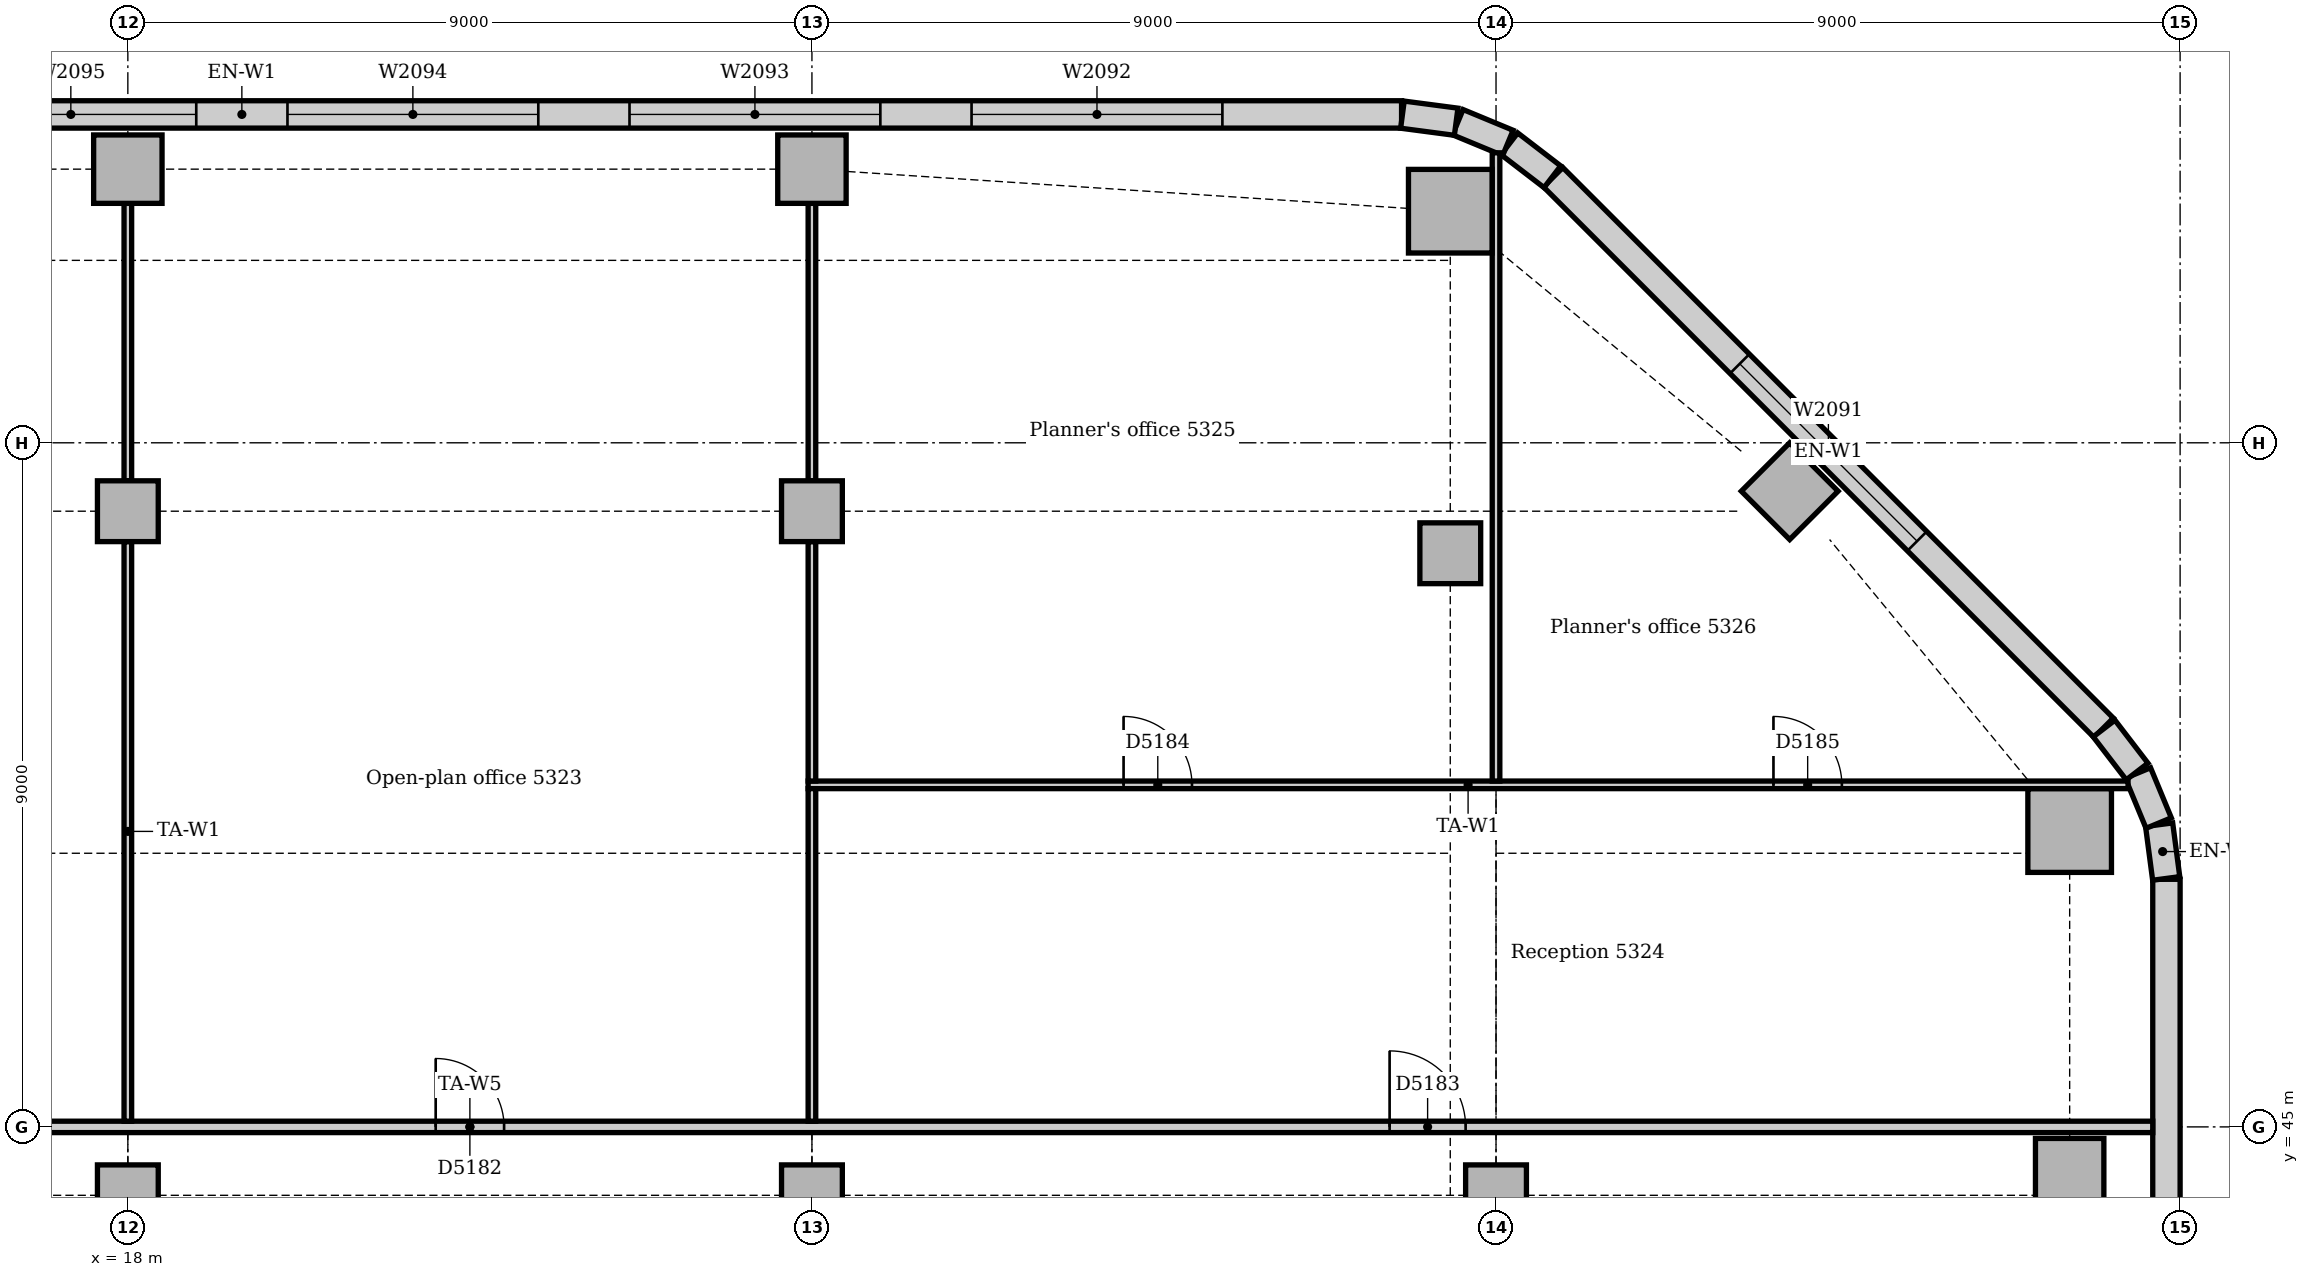
"""IFC4 building model, lengths in metres.
Left out: names, types, materials, properties, quantities, classifications, styles, units other than length and angle.
Written with IfcOpenShell. Run it as: python <this file> out.ifc"""

import sys

from ifc_helpers import new_model, si_unit, direction, frame, frame_2d, origin, origin_2d, place, context, subcontext, project, spatial, rectangle, extrude, element, fill, save


model = new_model("IFC4")
c1 = context("Model", 3, precision=1e-05, world=origin(), true_north=direction((0.0, 1.0)))
c2 = subcontext(c1, "Body", "Model", "MODEL_VIEW")
j1 = project(units=[si_unit("LENGTHUNIT", "METRE"), si_unit("PLANEANGLEUNIT", "RADIAN")], contexts=[c1])
p1 = place(None, origin())
s1 = spatial("IfcSite", under=j1, at=p1, CompositionType="ELEMENT")
p2 = place(p1, origin())
s2 = spatial("IfcBuilding", under=s1, at=p2, CompositionType="ELEMENT")
p3 = place(p2, frame((0.0, 0.0, 222.0)))
s3 = spatial("IfcBuildingStorey", under=s2, at=p3, CompositionType="ELEMENT", Elevation=222.0)
for number, where, z_axis, x_axis in (
    (1, (43.547, 48.898, 0.0), (0.0, 0.0, 1.0), (1.0, 0.0, 0.0)),
    (2, (35.398, 57.047, 0.0), (0.0, 0.0, 1.0), (1.0, 0.0, 0.0)),
):
    element("IfcColumn", number, at=place(p3, frame(where, z_axis=z_axis, x_axis=x_axis)), inside=s3, PredefinedType="COLUMN", context=c2, shape_type="SweptSolid", body=[
        extrude(rectangle(XDim=1.1, YDim=1.1, at=origin_2d()), origin(), (0.0, 0.0, 1.0), 3.85),
    ])
for number, where, z_axis, x_axis in (
    (3, (43.547, 44.398, 0.0), (0.0, 0.0, 1.0), (1.0, 0.0, 0.0)),
    (4, (39.864, 53.364, 0.0), (0.0, 0.0, 1.0), (0.707, 0.707, 0.0)),
    (5, (18.0, 57.6, 0.0), (0.0, 0.0, 1.0), (1.0, 0.0, 0.0)),
    (6, (27.0, 57.6, 0.0), (0.0, 0.0, 1.0), (1.0, 0.0, 0.0)),
):
    element("IfcColumn", number, at=place(p3, frame(where, z_axis=z_axis, x_axis=x_axis)), inside=s3, PredefinedType="COLUMN", context=c2, shape_type="SweptSolid", body=[
        extrude(rectangle(XDim=0.9, YDim=0.9, at=origin_2d()), origin(), (0.0, 0.0, 1.0), 3.85),
    ])
for number, where, z_axis, x_axis in (
    (7, (18.0, 44.1, 0.0), (0.0, 0.0, 1.0), (1.0, 0.0, 0.0)),
    (8, (18.0, 53.1, 0.0), (0.0, 0.0, 1.0), (1.0, 0.0, 0.0)),
    (9, (27.0, 44.1, 0.0), (0.0, 0.0, 1.0), (1.0, 0.0, 0.0)),
    (10, (27.0, 53.1, 0.0), (0.0, 0.0, 1.0), (1.0, 0.0, 0.0)),
    (11, (36.0, 44.1, 0.0), (0.0, 0.0, 1.0), (1.0, 0.0, 0.0)),
    (12, (35.398, 52.547, 0.0), (0.0, 0.0, 1.0), (1.0, 0.0, 0.0)),
):
    element("IfcColumn", number, at=place(p3, frame(where, z_axis=z_axis, x_axis=x_axis)), inside=s3, PredefinedType="COLUMN", context=c2, shape_type="SweptSolid", body=[
        extrude(rectangle(XDim=0.8, YDim=0.8, at=origin_2d()), origin(), (0.0, 0.0, 1.0), 3.85),
    ])
p4 = place(p3, frame((44.82, 23.743, 0.0), z_axis=(0.0, 0.0, 1.0), x_axis=(0.0, 1.0, 0.0)))
e13 = element("IfcWall", 13, at=p4, inside=s3, PredefinedType="STANDARD", context=c2, shape_type="SweptSolid", body=[
    extrude(rectangle(XDim=24.515, YDim=0.36, at=frame_2d((12.257, 0.0))), origin(), (0.0, 0.0, 1.0), 3.85),
])
p5 = place(p4, frame((3.857, 0.0, 0.9)))
e14 = element("IfcOpeningElement", 14, at=p5, cuts=e13, PredefinedType="OPENING", context=c2, shape_type="SweptSolid", body=[
    extrude(rectangle(XDim=3.3, YDim=1.6, at=frame_2d((1.65, 0.8))), frame((0.0, 0.19, 0.0), z_axis=(0.0, -1.0, 0.0), x_axis=(1.0, 0.0, 0.0)), (0.0, 0.0, 1.0), 0.38),
])
p6 = place(p4, frame((8.357, 0.0, 0.9)))
e15 = element("IfcOpeningElement", 15, at=p6, cuts=e13, PredefinedType="OPENING", context=c2, shape_type="SweptSolid", body=[
    extrude(rectangle(XDim=3.3, YDim=1.6, at=frame_2d((1.65, 0.8))), frame((0.0, 0.19, 0.0), z_axis=(0.0, -1.0, 0.0), x_axis=(1.0, 0.0, 0.0)), (0.0, 0.0, 1.0), 0.38),
])
p7 = place(p4, frame((12.857, 0.0, 0.9)))
e16 = element("IfcOpeningElement", 16, at=p7, cuts=e13, PredefinedType="OPENING", context=c2, shape_type="SweptSolid", body=[
    extrude(rectangle(XDim=3.3, YDim=1.6, at=frame_2d((1.65, 0.8))), frame((0.0, 0.19, 0.0), z_axis=(0.0, -1.0, 0.0), x_axis=(1.0, 0.0, 0.0)), (0.0, 0.0, 1.0), 0.38),
])
p8 = place(p4, frame((18.457, 0.0, 0.9)))
e17 = element("IfcOpeningElement", 17, at=p8, cuts=e13, PredefinedType="OPENING", context=c2, shape_type="SweptSolid", body=[
    extrude(rectangle(XDim=1.8, YDim=1.6, at=frame_2d((0.9, 0.8))), frame((0.0, 0.19, 0.0), z_axis=(0.0, -1.0, 0.0), x_axis=(1.0, 0.0, 0.0)), (0.0, 0.0, 1.0), 0.38),
])
p9 = place(p3, frame((43.994, 50.251, 0.0), z_axis=(0.0, 0.0, 1.0), x_axis=(-0.707106781187, 0.707106781187, 0.0)))
e18 = element("IfcWall", 18, at=p9, inside=s3, PredefinedType="STANDARD", context=c2, shape_type="SweptSolid", body=[
    extrude(rectangle(XDim=10.243, YDim=0.36, at=frame_2d((5.121, 0.0))), origin(), (0.0, 0.0, 1.0), 3.85),
])
p10 = place(p9, frame((3.471, 0.0, 0.9)))
e19 = element("IfcOpeningElement", 19, at=p10, cuts=e18, PredefinedType="OPENING", context=c2, shape_type="SweptSolid", body=[
    extrude(rectangle(XDim=3.3, YDim=1.6, at=frame_2d((1.65, 0.8))), frame((0.0, 0.19, 0.0), z_axis=(0.0, -1.0, 0.0), x_axis=(1.0, 0.0, 0.0)), (0.0, 0.0, 1.0), 0.38),
])
p11 = place(p3, frame((34.757, 58.32, 0.0), z_axis=(0.0, 0.0, 1.0), x_axis=(-1.0, 0.0, 0.0)))
e20 = element("IfcWall", 20, at=p11, inside=s3, PredefinedType="STANDARD", context=c2, shape_type="SweptSolid", body=[
    extrude(rectangle(XDim=30.515, YDim=0.36, at=frame_2d((15.257, 0.0))), origin(), (0.0, 0.0, 1.0), 3.85),
])
p12 = place(p11, frame((2.357, 0.0, 0.9)))
e21 = element("IfcOpeningElement", 21, at=p12, cuts=e20, PredefinedType="OPENING", context=c2, shape_type="SweptSolid", body=[
    extrude(rectangle(XDim=3.3, YDim=1.6, at=frame_2d((1.65, 0.8))), frame((0.0, 0.19, 0.0), z_axis=(0.0, -1.0, 0.0), x_axis=(1.0, 0.0, 0.0)), (0.0, 0.0, 1.0), 0.38),
])
p13 = place(p11, frame((6.857, 0.0, 0.9)))
e22 = element("IfcOpeningElement", 22, at=p13, cuts=e20, PredefinedType="OPENING", context=c2, shape_type="SweptSolid", body=[
    extrude(rectangle(XDim=3.3, YDim=1.6, at=frame_2d((1.65, 0.8))), frame((0.0, 0.19, 0.0), z_axis=(0.0, -1.0, 0.0), x_axis=(1.0, 0.0, 0.0)), (0.0, 0.0, 1.0), 0.38),
])
p14 = place(p11, frame((11.357, 0.0, 0.9)))
e23 = element("IfcOpeningElement", 23, at=p14, cuts=e20, PredefinedType="OPENING", context=c2, shape_type="SweptSolid", body=[
    extrude(rectangle(XDim=3.3, YDim=1.6, at=frame_2d((1.65, 0.8))), frame((0.0, 0.19, 0.0), z_axis=(0.0, -1.0, 0.0), x_axis=(1.0, 0.0, 0.0)), (0.0, 0.0, 1.0), 0.38),
])
p15 = place(p11, frame((15.857, 0.0, 0.9)))
e24 = element("IfcOpeningElement", 24, at=p15, cuts=e20, PredefinedType="OPENING", context=c2, shape_type="SweptSolid", body=[
    extrude(rectangle(XDim=3.3, YDim=1.6, at=frame_2d((1.65, 0.8))), frame((0.0, 0.19, 0.0), z_axis=(0.0, -1.0, 0.0), x_axis=(1.0, 0.0, 0.0)), (0.0, 0.0, 1.0), 0.38),
])
p16 = place(p11, frame((20.357, 0.0, 0.9)))
e25 = element("IfcOpeningElement", 25, at=p16, cuts=e20, PredefinedType="OPENING", context=c2, shape_type="SweptSolid", body=[
    extrude(rectangle(XDim=3.3, YDim=1.6, at=frame_2d((1.65, 0.8))), frame((0.0, 0.19, 0.0), z_axis=(0.0, -1.0, 0.0), x_axis=(1.0, 0.0, 0.0)), (0.0, 0.0, 1.0), 0.38),
])
p17 = place(p11, frame((24.857, 0.0, 0.9)))
e26 = element("IfcOpeningElement", 26, at=p17, cuts=e20, PredefinedType="OPENING", context=c2, shape_type="SweptSolid", body=[
    extrude(rectangle(XDim=3.3, YDim=1.6, at=frame_2d((1.65, 0.8))), frame((0.0, 0.19, 0.0), z_axis=(0.0, -1.0, 0.0), x_axis=(1.0, 0.0, 0.0)), (0.0, 0.0, 1.0), 0.38),
])
for number, where, z_axis, x_axis in (
    (27, (44.817, 48.269, 0.0), (0.0, 0.0, 1.0), (-0.131, 0.991, 0.0)),
    (28, (44.718, 48.997, 0.0), (0.0, 0.0, 1.0), (-0.383, 0.924, 0.0)),
):
    element("IfcWall", number, at=place(p3, frame(where, z_axis=z_axis, x_axis=x_axis)), inside=s3, PredefinedType="STANDARD", context=c2, shape_type="SweptSolid", body=[
        extrude(rectangle(XDim=0.713, YDim=0.36, at=frame_2d((0.356, 0.0))), origin(), (0.0, 0.0, 1.0), 3.85),
    ])
for number, where, z_axis, x_axis in (
    (29, (44.434, 49.675, 0.0), (0.0, 0.0, 1.0), (-0.609, 0.793, 0.0)),
    (30, (36.741, 57.5, 0.0), (0.0, 0.0, 1.0), (-0.793, 0.609, 0.0)),
):
    element("IfcWall", number, at=place(p3, frame(where, z_axis=z_axis, x_axis=x_axis)), inside=s3, PredefinedType="STANDARD", context=c2, shape_type="SweptSolid", body=[
        extrude(rectangle(XDim=0.713, YDim=0.36, at=frame_2d((0.357, 0.0))), origin(), (0.0, 0.0, 1.0), 3.85),
    ])
for number, where, z_axis, x_axis in (
    (31, (36.156, 57.945, 0.0), (0.0, 0.0, 1.0), (-0.924, 0.383, 0.0)),
    (32, (35.476, 58.224, 0.0), (0.0, 0.0, 1.0), (-0.991, 0.131, 0.0)),
):
    element("IfcWall", number, at=place(p3, frame(where, z_axis=z_axis, x_axis=x_axis)), inside=s3, PredefinedType="STANDARD", context=c2, shape_type="SweptSolid", body=[
        extrude(rectangle(XDim=0.713, YDim=0.36, at=frame_2d((0.356, 0.0))), origin(), (0.0, 0.0, 1.0), 3.85),
    ])
p18 = place(p3, frame((0.36, 45.0, 0.0), z_axis=(0.0, 0.0, 1.0), x_axis=(1.0, 0.0, 0.0)))
e33 = element("IfcWall", 33, at=p18, inside=s3, PredefinedType="PARTITIONING", context=c2, shape_type="SweptSolid", body=[
    extrude(rectangle(XDim=44.28, YDim=0.15, at=frame_2d((22.14, 0.0))), origin(), (0.0, 0.0, 1.0), 3.85),
])
p19 = place(p18, frame((9.05, 0.0, 0.0)))
e34 = element("IfcOpeningElement", 34, at=p19, cuts=e33, PredefinedType="OPENING", context=c2, shape_type="SweptSolid", body=[
    extrude(rectangle(XDim=0.9, YDim=2.1, at=frame_2d((0.45, 1.05))), frame((0.0, 0.085, 0.0), z_axis=(0.0, -1.0, 0.0), x_axis=(1.0, 0.0, 0.0)), (0.0, 0.0, 1.0), 0.17),
])
p20 = place(p18, frame((21.69, 0.0, 0.0)))
e35 = element("IfcOpeningElement", 35, at=p20, cuts=e33, PredefinedType="OPENING", context=c2, shape_type="SweptSolid", body=[
    extrude(rectangle(XDim=0.9, YDim=2.1, at=frame_2d((0.45, 1.05))), frame((0.0, 0.085, 0.0), z_axis=(0.0, -1.0, 0.0), x_axis=(1.0, 0.0, 0.0)), (0.0, 0.0, 1.0), 0.17),
])
p21 = place(p18, frame((34.24, 0.0, 0.0)))
e36 = element("IfcOpeningElement", 36, at=p21, cuts=e33, PredefinedType="OPENING", context=c2, shape_type="SweptSolid", body=[
    extrude(rectangle(XDim=1.0, YDim=2.1, at=frame_2d((0.5, 1.05))), frame((0.0, 0.085, 0.0), z_axis=(0.0, -1.0, 0.0), x_axis=(1.0, 0.0, 0.0)), (0.0, 0.0, 1.0), 0.17),
])
p22 = place(p3, frame((26.95, 49.5, 0.0), z_axis=(0.0, 0.0, 1.0), x_axis=(1.0, 0.0, 0.0)))
e37 = element("IfcWall", 37, at=p22, inside=s3, PredefinedType="PARTITIONING", context=c2, shape_type="SweptSolid", body=[
    extrude(rectangle(XDim=17.365, YDim=0.1, at=frame_2d((8.682, 0.0))), origin(), (0.0, 0.0, 1.0), 3.85),
])
p23 = place(p22, frame((4.15, 0.0, 0.0)))
e38 = element("IfcOpeningElement", 38, at=p23, cuts=e37, PredefinedType="OPENING", context=c2, shape_type="SweptSolid", body=[
    extrude(rectangle(XDim=0.9, YDim=2.1, at=frame_2d((0.45, 1.05))), frame((0.0, 0.06, 0.0), z_axis=(0.0, -1.0, 0.0), x_axis=(1.0, 0.0, 0.0)), (0.0, 0.0, 1.0), 0.12),
])
p24 = place(p22, frame((12.7, 0.0, 0.0)))
e39 = element("IfcOpeningElement", 39, at=p24, cuts=e37, PredefinedType="OPENING", context=c2, shape_type="SweptSolid", body=[
    extrude(rectangle(XDim=0.9, YDim=2.1, at=frame_2d((0.45, 1.05))), frame((0.0, 0.06, 0.0), z_axis=(0.0, -1.0, 0.0), x_axis=(1.0, 0.0, 0.0)), (0.0, 0.0, 1.0), 0.12),
])
p25 = place(p3, frame((18.0, 45.075, 0.0), z_axis=(0.0, 0.0, 1.0), x_axis=(0.0, 1.0, 0.0)))
e40 = element("IfcWall", 40, at=p25, inside=s3, PredefinedType="PARTITIONING", context=c2, shape_type="SweptSolid", body=[
    extrude(rectangle(XDim=7.625, YDim=0.1, at=frame_2d((3.812, 0.0))), origin(), (0.0, 0.0, 1.0), 3.35),
])
p26 = place(p3, frame((18.0, 53.5, 0.0), z_axis=(0.0, 0.0, 1.0), x_axis=(0.0, 1.0, 0.0)))
e41 = element("IfcWall", 41, at=p26, inside=s3, PredefinedType="PARTITIONING", context=c2, shape_type="SweptSolid", body=[
    extrude(rectangle(XDim=3.65, YDim=0.1, at=frame_2d((1.825, 0.0))), origin(), (0.0, 0.0, 1.0), 3.41),
])
p27 = place(p3, frame((27.0, 45.075, 0.0), z_axis=(0.0, 0.0, 1.0), x_axis=(0.0, 1.0, 0.0)))
e42 = element("IfcWall", 42, at=p27, inside=s3, PredefinedType="PARTITIONING", context=c2, shape_type="SweptSolid", body=[
    extrude(rectangle(XDim=4.375, YDim=0.1, at=frame_2d((2.188, 0.0))), origin(), (0.0, 0.0, 1.0), 3.35),
])
p28 = place(p3, frame((27.0, 49.55, 0.0), z_axis=(0.0, 0.0, 1.0), x_axis=(0.0, 1.0, 0.0)))
e43 = element("IfcWall", 43, at=p28, inside=s3, PredefinedType="PARTITIONING", context=c2, shape_type="SweptSolid", body=[
    extrude(rectangle(XDim=3.15, YDim=0.1, at=frame_2d((1.575, 0.0))), origin(), (0.0, 0.0, 1.0), 3.35),
])
p29 = place(p3, frame((27.0, 53.5, 0.0), z_axis=(0.0, 0.0, 1.0), x_axis=(0.0, 1.0, 0.0)))
e44 = element("IfcWall", 44, at=p29, inside=s3, PredefinedType="PARTITIONING", context=c2, shape_type="SweptSolid", body=[
    extrude(rectangle(XDim=3.65, YDim=0.1, at=frame_2d((1.825, 0.0))), origin(), (0.0, 0.0, 1.0), 3.41),
])
p30 = place(p3, frame((36.0, 49.55, 0.0), z_axis=(0.0, 0.0, 1.0), x_axis=(0.0, 1.0, 0.0)))
e45 = element("IfcWall", 45, at=p30, inside=s3, PredefinedType="PARTITIONING", context=c2, shape_type="SweptSolid", body=[
    extrude(rectangle(XDim=8.265, YDim=0.1, at=frame_2d((4.133, 0.0))), origin(), (0.0, 0.0, 1.0), 3.35),
])
p31 = place(p10, origin())
e46 = element("IfcWindow", 46, at=p31, inside=s3, PartitioningType="SINGLE_PANEL", PredefinedType="WINDOW", context=c2, shape_type="SweptSolid", body=[
    extrude(rectangle(XDim=3.3, YDim=1.6, at=frame_2d((1.65, 0.8))), frame((0.0, 0.13, 0.0), z_axis=(0.0, -1.0, 0.0), x_axis=(1.0, 0.0, 0.0)), (0.0, 0.0, 1.0), 0.06),
])
fill(e19, e46)
p32 = place(p12, origin())
e47 = element("IfcWindow", 47, at=p32, inside=s3, PartitioningType="SINGLE_PANEL", PredefinedType="WINDOW", context=c2, shape_type="SweptSolid", body=[
    extrude(rectangle(XDim=3.3, YDim=1.6, at=frame_2d((1.65, 0.8))), frame((0.0, 0.13, 0.0), z_axis=(0.0, -1.0, 0.0), x_axis=(1.0, 0.0, 0.0)), (0.0, 0.0, 1.0), 0.06),
])
fill(e21, e47)
p33 = place(p13, origin())
e48 = element("IfcWindow", 48, at=p33, inside=s3, PartitioningType="SINGLE_PANEL", PredefinedType="WINDOW", context=c2, shape_type="SweptSolid", body=[
    extrude(rectangle(XDim=3.3, YDim=1.6, at=frame_2d((1.65, 0.8))), frame((0.0, 0.13, 0.0), z_axis=(0.0, -1.0, 0.0), x_axis=(1.0, 0.0, 0.0)), (0.0, 0.0, 1.0), 0.06),
])
fill(e22, e48)
p34 = place(p14, origin())
e49 = element("IfcWindow", 49, at=p34, inside=s3, PartitioningType="SINGLE_PANEL", PredefinedType="WINDOW", context=c2, shape_type="SweptSolid", body=[
    extrude(rectangle(XDim=3.3, YDim=1.6, at=frame_2d((1.65, 0.8))), frame((0.0, 0.13, 0.0), z_axis=(0.0, -1.0, 0.0), x_axis=(1.0, 0.0, 0.0)), (0.0, 0.0, 1.0), 0.06),
])
fill(e23, e49)
p35 = place(p15, origin())
e50 = element("IfcWindow", 50, at=p35, inside=s3, PartitioningType="SINGLE_PANEL", PredefinedType="WINDOW", context=c2, shape_type="SweptSolid", body=[
    extrude(rectangle(XDim=3.3, YDim=1.6, at=frame_2d((1.65, 0.8))), frame((0.0, 0.13, 0.0), z_axis=(0.0, -1.0, 0.0), x_axis=(1.0, 0.0, 0.0)), (0.0, 0.0, 1.0), 0.06),
])
fill(e24, e50)
p36 = place(p20, origin())
e51 = element("IfcDoor", 51, at=p36, inside=s3, OperationType="SINGLE_SWING_LEFT", PredefinedType="DOOR", context=c2, shape_type="SweptSolid", body=[
    extrude(rectangle(XDim=0.9, YDim=2.1, at=frame_2d((0.45, 1.05))), frame((0.0, 0.025, 0.0), z_axis=(0.0, -1.0, 0.0), x_axis=(1.0, 0.0, 0.0)), (0.0, 0.0, 1.0), 0.05),
])
fill(e35, e51)
p37 = place(p21, origin())
e52 = element("IfcDoor", 52, at=p37, inside=s3, OperationType="SINGLE_SWING_LEFT", PredefinedType="DOOR", context=c2, shape_type="SweptSolid", body=[
    extrude(rectangle(XDim=1.0, YDim=2.1, at=frame_2d((0.5, 1.05))), frame((0.0, 0.025, 0.0), z_axis=(0.0, -1.0, 0.0), x_axis=(1.0, 0.0, 0.0)), (0.0, 0.0, 1.0), 0.05),
])
fill(e36, e52)
p38 = place(p23, origin())
e53 = element("IfcDoor", 53, at=p38, inside=s3, OperationType="SINGLE_SWING_LEFT", PredefinedType="DOOR", context=c2, shape_type="SweptSolid", body=[
    extrude(rectangle(XDim=0.9, YDim=2.1, at=frame_2d((0.45, 1.05))), frame((0.0, 0.025, 0.0), z_axis=(0.0, -1.0, 0.0), x_axis=(1.0, 0.0, 0.0)), (0.0, 0.0, 1.0), 0.05),
])
fill(e38, e53)
p39 = place(p24, origin())
e54 = element("IfcDoor", 54, at=p39, inside=s3, OperationType="SINGLE_SWING_LEFT", PredefinedType="DOOR", context=c2, shape_type="SweptSolid", body=[
    extrude(rectangle(XDim=0.9, YDim=2.1, at=frame_2d((0.45, 1.05))), frame((0.0, 0.025, 0.0), z_axis=(0.0, -1.0, 0.0), x_axis=(1.0, 0.0, 0.0)), (0.0, 0.0, 1.0), 0.05),
])
fill(e39, e54)
save(model, sys.argv[1])
